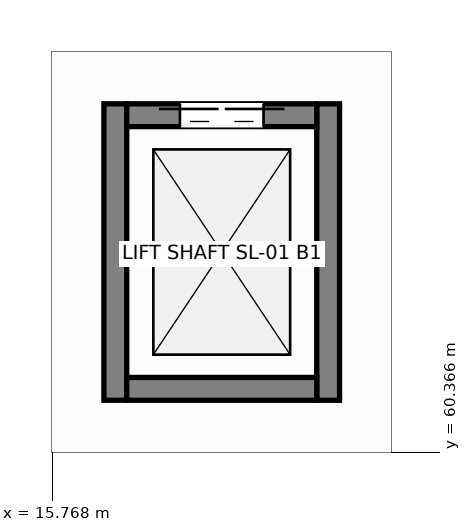
"""IFC4 building model, lengths in metres.
Left out: names, types, materials, properties, quantities, classifications, styles, units other than length and angle.
Written with IfcOpenShell. Run it as: python <this file> out.ifc"""

import sys

from ifc_helpers import new_model, si_unit, direction, frame, frame_2d, origin, place, context, subcontext, project, spatial, rectangle, extrude, element, fill, save


model = new_model("IFC4")
c1 = context("Model", 3, precision=1e-05, world=origin(), true_north=direction((0.0, 1.0)))
c2 = subcontext(c1, "Body", "Model", "MODEL_VIEW")
j1 = project(units=[si_unit("LENGTHUNIT", "METRE"), si_unit("PLANEANGLEUNIT", "RADIAN")], contexts=[c1])
p1 = place(None, origin())
s1 = spatial("IfcSite", under=j1, at=p1, CompositionType="ELEMENT")
p2 = place(p1, origin())
s2 = spatial("IfcBuilding", under=s1, at=p2, CompositionType="ELEMENT")
p3 = place(p2, frame((0.0, 0.0, -4.2)))
s3 = spatial("IfcBuildingStorey", under=s2, at=p3, CompositionType="ELEMENT", Elevation=-4.2)
for number, where, z_axis, x_axis in (
    (1, (16.6, 61.05, 0.0), (0.0, 0.0, 1.0), (0.0, 1.0, 0.0)),
    (2, (19.4, 61.05, 0.0), (0.0, 0.0, 1.0), (0.0, 1.0, 0.0)),
):
    element("IfcWall", number, at=place(p3, frame(where, z_axis=z_axis, x_axis=x_axis)), inside=s3, PredefinedType="SHEAR", context=c2, shape_type="SweptSolid", body=[
        extrude(rectangle(XDim=3.9, YDim=0.3, at=frame_2d((1.95, 0.0))), origin(), (0.0, 0.0, 1.0), 3.96),
    ])
p4 = place(p3, frame((16.75, 64.8, 0.0), z_axis=(0.0, 0.0, 1.0), x_axis=(1.0, 0.0, 0.0)))
e3 = element("IfcWall", 3, at=p4, inside=s3, PredefinedType="SHEAR", context=c2, shape_type="SweptSolid", body=[
    extrude(rectangle(XDim=2.5, YDim=0.3, at=frame_2d((1.25, 0.0))), origin(), (0.0, 0.0, 1.0), 3.96),
])
p5 = place(p4, frame((0.7, 0.0, 0.0)))
e4 = element("IfcOpeningElement", 4, at=p5, cuts=e3, PredefinedType="OPENING", context=c2, shape_type="SweptSolid", body=[
    extrude(rectangle(XDim=1.1, YDim=2.15, at=frame_2d((0.55, 1.075))), frame((0.0, 0.16, 0.0), z_axis=(0.0, -1.0, 0.0), x_axis=(1.0, 0.0, 0.0)), (0.0, 0.0, 1.0), 0.32),
])
p6 = place(p3, frame((16.75, 61.2, 0.0), z_axis=(0.0, 0.0, 1.0), x_axis=(1.0, 0.0, 0.0)))
e5 = element("IfcWall", 5, at=p6, inside=s3, PredefinedType="SHEAR", context=c2, shape_type="SweptSolid", body=[
    extrude(rectangle(XDim=2.5, YDim=0.3, at=frame_2d((1.25, 0.0))), origin(), (0.0, 0.0, 1.0), 3.96),
])
p7 = place(p5, origin())
e6 = element("IfcDoor", 6, at=p7, inside=s3, OperationType="DOUBLE_DOOR_SLIDING", PredefinedType="DOOR", context=c2, shape_type="SweptSolid", body=[
    extrude(rectangle(XDim=1.1, YDim=2.15, at=frame_2d((0.55, 1.075))), frame((0.0, 0.025, 0.0), z_axis=(0.0, -1.0, 0.0), x_axis=(1.0, 0.0, 0.0)), (0.0, 0.0, 1.0), 0.05),
])
fill(e4, e6)
save(model, sys.argv[1])
